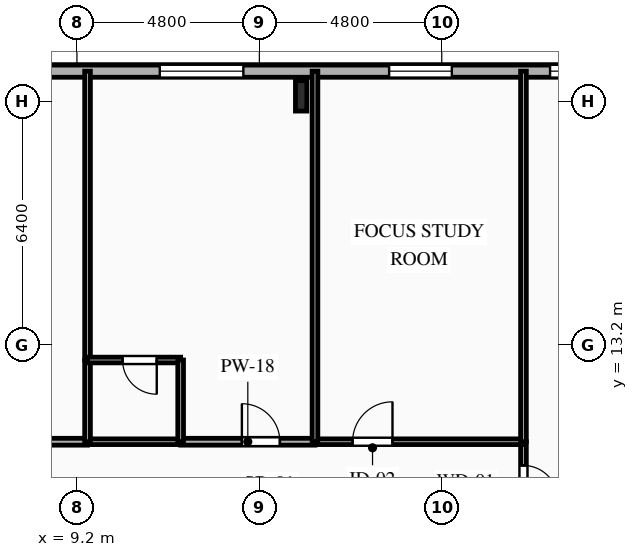
"""IFC4 building model, lengths in metres.
Left out: names, types, materials, properties, quantities, classifications, styles, units other than length and angle.
Written with IfcOpenShell. Run it as: python <this file> out.ifc"""

import sys

from ifc_helpers import new_model, si_unit, direction, frame, frame_2d, origin, origin_2d, place, context, subcontext, project, spatial, rectangle, i_section, extrude, element, fill, save


model = new_model("IFC4")
c1 = context("Model", 3, precision=1e-05, world=origin(), true_north=direction((0.0, 1.0)))
c2 = subcontext(c1, "Body", "Model", "MODEL_VIEW")
j1 = project(units=[si_unit("LENGTHUNIT", "METRE"), si_unit("PLANEANGLEUNIT", "RADIAN")], contexts=[c1])
p1 = place(None, origin())
s1 = spatial("IfcSite", under=j1, at=p1, CompositionType="ELEMENT")
p2 = place(p1, origin())
s2 = spatial("IfcBuilding", under=s1, at=p2, CompositionType="ELEMENT")
p3 = place(p2, frame((0.0, 0.0, 141.05)))
s3 = spatial("IfcBuildingStorey", under=s2, at=p3, CompositionType="ELEMENT", Elevation=141.05)
p4 = place(p3, frame((15.1, 19.75, 0.0), z_axis=(0.0, 0.0, 1.0), x_axis=(1.0, 0.0, 0.0)))
e1 = element("IfcColumn", 1, at=p4, inside=s3, PredefinedType="COLUMN", context=c2, shape_type="SweptSolid", body=[
    extrude(i_section(OverallWidth=0.3, OverallDepth=0.8, WebThickness=0.018, FlangeThickness=0.033, FilletRadius=0.03, at=origin_2d()), origin(), (0.0, 0.0, 1.0), 3.35),
])
p5 = place(p3, frame((-25.8, 20.4, 0.0), z_axis=(0.0, 0.0, 1.0), x_axis=(1.0, 0.0, 0.0)))
e2 = element("IfcWall", 2, at=p5, inside=s3, PredefinedType="SOLIDWALL", context=c2, shape_type="SweptSolid", body=[
    extrude(rectangle(XDim=49.6, YDim=0.32, at=frame_2d((24.8, 0.0))), origin(), (0.0, 0.0, 1.0), 3.04),
])
p6 = place(p5, frame((2.135, 0.0, 0.85)))
e3 = element("IfcOpeningElement", 3, at=p6, cuts=e2, PredefinedType="OPENING", context=c2, shape_type="SweptSolid", body=[
    extrude(rectangle(XDim=1.65, YDim=1.85, at=frame_2d((0.825, 0.925))), frame((0.0, 0.17, 0.0), z_axis=(0.0, -1.0, 0.0), x_axis=(1.0, 0.0, 0.0)), (0.0, 0.0, 1.0), 0.34),
])
p7 = place(p5, frame((6.706, 0.0, 0.85)))
e4 = element("IfcOpeningElement", 4, at=p7, cuts=e2, PredefinedType="OPENING", context=c2, shape_type="SweptSolid", body=[
    extrude(rectangle(XDim=1.65, YDim=1.85, at=frame_2d((0.825, 0.925))), frame((0.0, 0.17, 0.0), z_axis=(0.0, -1.0, 0.0), x_axis=(1.0, 0.0, 0.0)), (0.0, 0.0, 1.0), 0.34),
])
p8 = place(p5, frame((14.76, 0.0, 0.85)))
e5 = element("IfcOpeningElement", 5, at=p8, cuts=e2, PredefinedType="OPENING", context=c2, shape_type="SweptSolid", body=[
    extrude(rectangle(XDim=1.6, YDim=1.85, at=frame_2d((0.8, 0.925))), frame((0.0, 0.17, 0.0), z_axis=(0.0, -1.0, 0.0), x_axis=(1.0, 0.0, 0.0)), (0.0, 0.0, 1.0), 0.34),
])
p9 = place(p5, frame((19.26, 0.0, 0.85)))
e6 = element("IfcOpeningElement", 6, at=p9, cuts=e2, PredefinedType="OPENING", context=c2, shape_type="SweptSolid", body=[
    extrude(rectangle(XDim=2.2, YDim=1.85, at=frame_2d((1.1, 0.925))), frame((0.0, 0.17, 0.0), z_axis=(0.0, -1.0, 0.0), x_axis=(1.0, 0.0, 0.0)), (0.0, 0.0, 1.0), 0.34),
])
p10 = place(p5, frame((25.26, 0.0, 0.85)))
e7 = element("IfcOpeningElement", 7, at=p10, cuts=e2, PredefinedType="OPENING", context=c2, shape_type="SweptSolid", body=[
    extrude(rectangle(XDim=2.2, YDim=1.85, at=frame_2d((1.1, 0.925))), frame((0.0, 0.17, 0.0), z_axis=(0.0, -1.0, 0.0), x_axis=(1.0, 0.0, 0.0)), (0.0, 0.0, 1.0), 0.34),
])
p11 = place(p5, frame((30.4, 0.0, 0.85)))
e8 = element("IfcOpeningElement", 8, at=p11, cuts=e2, PredefinedType="OPENING", context=c2, shape_type="SweptSolid", body=[
    extrude(rectangle(XDim=2.2, YDim=1.85, at=frame_2d((1.1, 0.925))), frame((0.0, 0.17, 0.0), z_axis=(0.0, -1.0, 0.0), x_axis=(1.0, 0.0, 0.0)), (0.0, 0.0, 1.0), 0.34),
])
p12 = place(p5, frame((37.18, 0.0, 0.85)))
e9 = element("IfcOpeningElement", 9, at=p12, cuts=e2, PredefinedType="OPENING", context=c2, shape_type="SweptSolid", body=[
    extrude(rectangle(XDim=2.2, YDim=1.85, at=frame_2d((1.1, 0.925))), frame((0.0, 0.17, 0.0), z_axis=(0.0, -1.0, 0.0), x_axis=(1.0, 0.0, 0.0)), (0.0, 0.0, 1.0), 0.34),
])
p13 = place(p5, frame((43.215, 0.0, 0.85)))
e10 = element("IfcOpeningElement", 10, at=p13, cuts=e2, PredefinedType="OPENING", context=c2, shape_type="SweptSolid", body=[
    extrude(rectangle(XDim=1.65, YDim=1.85, at=frame_2d((0.825, 0.925))), frame((0.0, 0.17, 0.0), z_axis=(0.0, -1.0, 0.0), x_axis=(1.0, 0.0, 0.0)), (0.0, 0.0, 1.0), 0.34),
])
p14 = place(p5, frame((47.45, 0.0, 0.85)))
e11 = element("IfcOpeningElement", 11, at=p14, cuts=e2, PredefinedType="OPENING", context=c2, shape_type="SweptSolid", body=[
    extrude(rectangle(XDim=1.1, YDim=1.85, at=frame_2d((0.55, 0.925))), frame((0.0, 0.17, 0.0), z_axis=(0.0, -1.0, 0.0), x_axis=(1.0, 0.0, 0.0)), (0.0, 0.0, 1.0), 0.34),
])
p15 = place(p3, frame((20.95, 10.65, 0.0), z_axis=(0.0, 0.0, 1.0), x_axis=(0.0, -1.0, 0.0)))
e12 = element("IfcWall", 12, at=p15, inside=s3, PredefinedType="PARTITIONING", context=c2, shape_type="SweptSolid", body=[
    extrude(rectangle(XDim=2.15, YDim=0.15, at=frame_2d((1.075, 0.0))), origin(), (0.0, 0.0, 1.0), 3.04),
])
p16 = place(p15, frame((0.625, 0.0, 0.0)))
e13 = element("IfcOpeningElement", 13, at=p16, cuts=e12, PredefinedType="OPENING", context=c2, shape_type="SweptSolid", body=[
    extrude(rectangle(XDim=0.9, YDim=2.1, at=frame_2d((0.45, 1.05))), frame((0.0, 0.085, 0.0), z_axis=(0.0, -1.0, 0.0), x_axis=(1.0, 0.0, 0.0)), (0.0, 0.0, 1.0), 0.17),
])
p17 = place(p3, frame((5.943, 10.65, 0.0), z_axis=(0.0, 0.0, 1.0), x_axis=(1.0, 0.0, 0.0)))
e14 = element("IfcWall", 14, at=p17, inside=s3, PredefinedType="PARTITIONING", context=c2, shape_type="SweptSolid", body=[
    extrude(rectangle(XDim=3.536, YDim=0.18, at=frame_2d((1.768, 0.0))), origin(), (0.0, 0.0, 1.0), 3.04),
])
p18 = place(p17, frame((0.752, 0.0, 0.0)))
e15 = element("IfcOpeningElement", 15, at=p18, cuts=e14, PredefinedType="OPENING", context=c2, shape_type="SweptSolid", body=[
    extrude(rectangle(XDim=1.0, YDim=2.15, at=frame_2d((0.5, 1.075))), frame((0.0, 0.1, 0.0), z_axis=(0.0, -1.0, 0.0), x_axis=(1.0, 0.0, 0.0)), (0.0, 0.0, 1.0), 0.2),
])
p19 = place(p3, frame((11.929, 10.65, 0.0), z_axis=(0.0, 0.0, 1.0), x_axis=(1.0, 0.0, 0.0)))
e16 = element("IfcWall", 16, at=p19, inside=s3, PredefinedType="PARTITIONING", context=c2, shape_type="SweptSolid", body=[
    extrude(rectangle(XDim=3.535, YDim=0.18, at=frame_2d((1.768, 0.0))), origin(), (0.0, 0.0, 1.0), 3.04),
])
p20 = place(p19, frame((1.611, 0.0, 0.0)))
e17 = element("IfcOpeningElement", 17, at=p20, cuts=e16, PredefinedType="OPENING", context=c2, shape_type="SweptSolid", body=[
    extrude(rectangle(XDim=1.0, YDim=2.15, at=frame_2d((0.5, 1.075))), frame((0.0, 0.1, 0.0), z_axis=(0.0, -1.0, 0.0), x_axis=(1.0, 0.0, 0.0)), (0.0, 0.0, 1.0), 0.2),
])
p21 = place(p3, frame((9.479, 10.65, 0.0), z_axis=(0.0, 0.0, 1.0), x_axis=(1.0, 0.0, 0.0)))
e18 = element("IfcWall", 18, at=p21, inside=s3, PredefinedType="PLUMBINGWALL", context=c2, shape_type="SweptSolid", body=[
    extrude(rectangle(XDim=2.45, YDim=0.15, at=frame_2d((1.225, 0.0))), origin(), (0.0, 0.0, 1.0), 3.04),
])
p22 = place(p3, frame((15.464, 10.65, 0.0), z_axis=(0.0, 0.0, 1.0), x_axis=(1.0, 0.0, 0.0)))
e19 = element("IfcWall", 19, at=p22, inside=s3, PredefinedType="PARTITIONING", context=c2, shape_type="SweptSolid", body=[
    extrude(rectangle(XDim=5.486, YDim=0.15, at=frame_2d((2.743, 0.0))), origin(), (0.0, 0.0, 1.0), 3.04),
])
p23 = place(p22, frame((0.99, 0.0, 0.0)))
e20 = element("IfcOpeningElement", 20, at=p23, cuts=e19, PredefinedType="OPENING", context=c2, shape_type="SweptSolid", body=[
    extrude(rectangle(XDim=1.05, YDim=2.15, at=frame_2d((0.525, 1.075))), frame((0.0, 0.085, 0.0), z_axis=(0.0, -1.0, 0.0), x_axis=(1.0, 0.0, 0.0)), (0.0, 0.0, 1.0), 0.17),
])
p24 = place(p3, frame((20.95, 10.65, 0.0), z_axis=(0.0, 0.0, 1.0), x_axis=(0.0, 1.0, 0.0)))
e21 = element("IfcWall", 21, at=p24, inside=s3, PredefinedType="PARTITIONING", context=c2, shape_type="SweptSolid", body=[
    extrude(rectangle(XDim=9.75, YDim=0.15, at=frame_2d((4.875, 0.0))), origin(), (0.0, 0.0, 1.0), 2.525),
])
p25 = place(p3, frame((9.479, 20.4, 0.0), z_axis=(0.0, 0.0, 1.0), x_axis=(0.0, -1.0, 0.0)))
e22 = element("IfcWall", 22, at=p25, inside=s3, PredefinedType="PARTITIONING", context=c2, shape_type="SweptSolid", body=[
    extrude(rectangle(XDim=7.6, YDim=0.15, at=frame_2d((3.8, 0.0))), origin(), (0.0, 0.0, 1.0), 3.04),
])
p26 = place(p3, frame((9.479, 12.8, 0.0), z_axis=(0.0, 0.0, 1.0), x_axis=(0.0, -1.0, 0.0)))
e23 = element("IfcWall", 23, at=p26, inside=s3, PredefinedType="PLUMBINGWALL", context=c2, shape_type="SweptSolid", body=[
    extrude(rectangle(XDim=2.15, YDim=0.15, at=frame_2d((1.075, 0.0))), origin(), (0.0, 0.0, 1.0), 3.04),
])
p27 = place(p3, frame((11.929, 12.8, 0.0), z_axis=(0.0, 0.0, 1.0), x_axis=(-1.0, 0.0, 0.0)))
e24 = element("IfcWall", 24, at=p27, inside=s3, PredefinedType="PLUMBINGWALL", context=c2, shape_type="SweptSolid", body=[
    extrude(rectangle(XDim=2.45, YDim=0.15, at=frame_2d((1.225, 0.0))), origin(), (0.0, 0.0, 1.0), 3.04),
])
p28 = place(p27, frame((0.629, 0.0, 0.0)))
e25 = element("IfcOpeningElement", 25, at=p28, cuts=e24, PredefinedType="OPENING", context=c2, shape_type="SweptSolid", body=[
    extrude(rectangle(XDim=0.9, YDim=2.1, at=frame_2d((0.45, 1.05))), frame((0.0, 0.085, 0.0), z_axis=(0.0, -1.0, 0.0), x_axis=(1.0, 0.0, 0.0)), (0.0, 0.0, 1.0), 0.17),
])
p29 = place(p3, frame((11.929, 10.65, 0.0), z_axis=(0.0, 0.0, 1.0), x_axis=(0.0, 1.0, 0.0)))
e26 = element("IfcWall", 26, at=p29, inside=s3, PredefinedType="PLUMBINGWALL", context=c2, shape_type="SweptSolid", body=[
    extrude(rectangle(XDim=2.15, YDim=0.15, at=frame_2d((1.075, 0.0))), origin(), (0.0, 0.0, 1.0), 3.04),
])
p30 = place(p3, frame((15.464, 20.4, 0.0), z_axis=(0.0, 0.0, 1.0), x_axis=(0.0, -1.0, 0.0)))
e27 = element("IfcWall", 27, at=p30, inside=s3, PredefinedType="PARTITIONING", context=c2, shape_type="SweptSolid", body=[
    extrude(rectangle(XDim=9.75, YDim=0.15, at=frame_2d((4.875, 0.0))), origin(), (0.0, 0.0, 1.0), 2.525),
])
p31 = place(p12, origin())
e28 = element("IfcWindow", 28, at=p31, inside=s3, PartitioningType="SINGLE_PANEL", PredefinedType="WINDOW", context=c2, shape_type="SweptSolid", body=[
    extrude(rectangle(XDim=2.2, YDim=1.85, at=frame_2d((1.1, 0.925))), frame((0.0, 0.03, 0.0), z_axis=(0.0, -1.0, 0.0), x_axis=(1.0, 0.0, 0.0)), (0.0, 0.0, 1.0), 0.06),
])
fill(e9, e28)
p32 = place(p13, origin())
e29 = element("IfcWindow", 29, at=p32, inside=s3, PartitioningType="SINGLE_PANEL", PredefinedType="WINDOW", context=c2, shape_type="SweptSolid", body=[
    extrude(rectangle(XDim=1.65, YDim=1.85, at=frame_2d((0.825, 0.925))), frame((0.0, 0.03, 0.0), z_axis=(0.0, -1.0, 0.0), x_axis=(1.0, 0.0, 0.0)), (0.0, 0.0, 1.0), 0.06),
])
fill(e10, e29)
p33 = place(p14, origin())
e30 = element("IfcWindow", 30, at=p33, inside=s3, PartitioningType="SINGLE_PANEL", PredefinedType="WINDOW", context=c2, shape_type="SweptSolid", body=[
    extrude(rectangle(XDim=1.1, YDim=1.85, at=frame_2d((0.55, 0.925))), frame((0.0, 0.03, 0.0), z_axis=(0.0, -1.0, 0.0), x_axis=(1.0, 0.0, 0.0)), (0.0, 0.0, 1.0), 0.06),
])
fill(e11, e30)
p34 = place(p16, origin())
e31 = element("IfcDoor", 31, at=p34, inside=s3, OperationType="SINGLE_SWING_RIGHT", PredefinedType="DOOR", context=c2, shape_type="SweptSolid", body=[
    extrude(rectangle(XDim=0.9, YDim=2.1, at=frame_2d((0.45, 1.05))), frame((0.0, 0.025, 0.0), z_axis=(0.0, -1.0, 0.0), x_axis=(1.0, 0.0, 0.0)), (0.0, 0.0, 1.0), 0.05),
])
fill(e13, e31)
p35 = place(p20, origin())
e32 = element("IfcDoor", 32, at=p35, inside=s3, OperationType="SINGLE_SWING_LEFT", PredefinedType="DOOR", context=c2, shape_type="SweptSolid", body=[
    extrude(rectangle(XDim=1.0, YDim=2.15, at=frame_2d((0.5, 1.075))), frame((0.0, 0.025, 0.0), z_axis=(0.0, -1.0, 0.0), x_axis=(1.0, 0.0, 0.0)), (0.0, 0.0, 1.0), 0.05),
])
fill(e17, e32)
p36 = place(p23, origin())
e33 = element("IfcDoor", 33, at=p36, inside=s3, OperationType="SINGLE_SWING_RIGHT", PredefinedType="DOOR", context=c2, shape_type="SweptSolid", body=[
    extrude(rectangle(XDim=1.05, YDim=2.15, at=frame_2d((0.525, 1.075))), frame((0.0, 0.025, 0.0), z_axis=(0.0, -1.0, 0.0), x_axis=(1.0, 0.0, 0.0)), (0.0, 0.0, 1.0), 0.05),
])
fill(e20, e33)
p37 = place(p28, origin())
e34 = element("IfcDoor", 34, at=p37, inside=s3, OperationType="SINGLE_SWING_LEFT", PredefinedType="DOOR", context=c2, shape_type="SweptSolid", body=[
    extrude(rectangle(XDim=0.9, YDim=2.1, at=frame_2d((0.45, 1.05))), frame((0.0, 0.025, 0.0), z_axis=(0.0, -1.0, 0.0), x_axis=(1.0, 0.0, 0.0)), (0.0, 0.0, 1.0), 0.05),
])
fill(e25, e34)
save(model, sys.argv[1])
